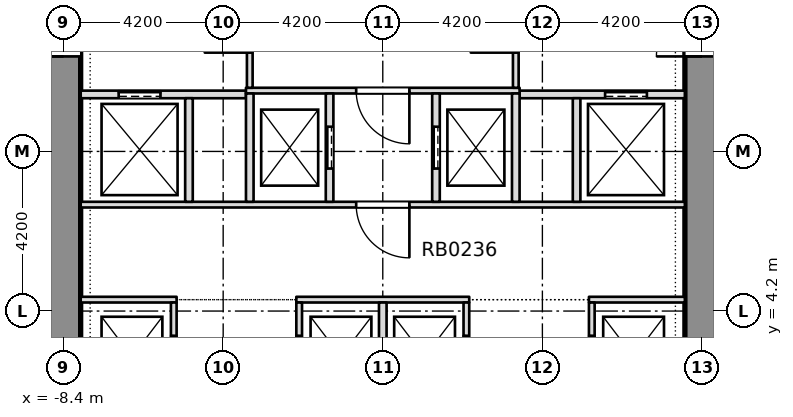
"""IFC4 building model, lengths in metres.
Left out: names, types, materials, properties, quantities, classifications, styles, units other than length and angle.
Written with IfcOpenShell. Run it as: python <this file> out.ifc"""

import sys

from ifc_helpers import new_model, si_unit, direction, frame, frame_2d, origin, place, context, subcontext, project, spatial, rectangle, extrude, element, fill, save


model = new_model("IFC4")
c1 = context("Model", 3, precision=1e-05, world=origin(), true_north=direction((0.0, 1.0)))
c2 = subcontext(c1, "Body", "Model", "MODEL_VIEW")
j1 = project(units=[si_unit("LENGTHUNIT", "METRE"), si_unit("PLANEANGLEUNIT", "RADIAN")], contexts=[c1])
p1 = place(None, origin())
s1 = spatial("IfcSite", under=j1, at=p1, CompositionType="ELEMENT")
p2 = place(p1, origin())
s2 = spatial("IfcBuilding", under=s1, at=p2, CompositionType="ELEMENT")
p3 = place(p2, frame((0.0, 0.0, -8.4)))
s3 = spatial("IfcBuildingStorey", under=s2, at=p3, CompositionType="ELEMENT", Elevation=-8.4)
p4 = place(p3, frame((-8.4, -7.5, 0.0), z_axis=(0.0, 0.0, 1.0), x_axis=(0.0, 1.0, 0.0)))
e1 = element("IfcWall", 1, at=p4, inside=s3, PredefinedType="SHEAR", context=c2, shape_type="SweptSolid", body=[
    extrude(rectangle(XDim=28.35, YDim=0.9, at=frame_2d((14.175, 0.0))), origin(), (0.0, 0.0, 1.0), 3.85),
])
p5 = place(p4, frame((18.4, 0.0, 0.0)))
e2 = element("IfcOpeningElement", 2, at=p5, cuts=e1, PredefinedType="OPENING", context=c2, shape_type="SweptSolid", body=[
    extrude(rectangle(XDim=1.2, YDim=2.1, at=frame_2d((0.6, 1.05))), frame((0.0, 0.46, 0.0), z_axis=(0.0, -1.0, 0.0), x_axis=(1.0, 0.0, 0.0)), (0.0, 0.0, 1.0), 0.92),
])
p6 = place(p3, frame((8.4, -7.5, 0.0), z_axis=(0.0, 0.0, 1.0), x_axis=(0.0, 1.0, 0.0)))
e3 = element("IfcWall", 3, at=p6, inside=s3, PredefinedType="SHEAR", context=c2, shape_type="SweptSolid", body=[
    extrude(rectangle(XDim=28.35, YDim=0.9, at=frame_2d((14.175, 0.0))), origin(), (0.0, 0.0, 1.0), 3.85),
])
p7 = place(p6, frame((18.4, 0.0, 0.0)))
e4 = element("IfcOpeningElement", 4, at=p7, cuts=e3, PredefinedType="OPENING", context=c2, shape_type="SweptSolid", body=[
    extrude(rectangle(XDim=1.2, YDim=2.1, at=frame_2d((0.6, 1.05))), frame((0.0, 0.46, 0.0), z_axis=(0.0, -1.0, 0.0), x_axis=(1.0, 0.0, 0.0)), (0.0, 0.0, 1.0), 0.92),
])
p8 = place(p3, frame((-7.949, 4.5, 0.0), z_axis=(0.0, 0.0, 1.0), x_axis=(1.0, 0.0, 0.0)))
e5 = element("IfcWall", 5, at=p8, inside=s3, PredefinedType="PARTITIONING", context=c2, shape_type="SweptSolid", body=[
    extrude(rectangle(XDim=2.524, YDim=0.15, at=frame_2d((1.262, 0.0))), origin(), (0.0, 0.0, 1.0), 3.85),
])
p9 = place(p3, frame((-2.275, 4.5, 0.0), z_axis=(0.0, 0.0, 1.0), x_axis=(1.0, 0.0, 0.0)))
e6 = element("IfcWall", 6, at=p9, inside=s3, PredefinedType="PARTITIONING", context=c2, shape_type="SweptSolid", body=[
    extrude(rectangle(XDim=4.55, YDim=0.15, at=frame_2d((2.275, 0.0))), origin(), (0.0, 0.0, 1.0), 3.85),
])
p10 = place(p3, frame((5.425, 4.5, 0.0), z_axis=(0.0, 0.0, 1.0), x_axis=(1.0, 0.0, 0.0)))
e7 = element("IfcWall", 7, at=p10, inside=s3, PredefinedType="PARTITIONING", context=c2, shape_type="SweptSolid", body=[
    extrude(rectangle(XDim=2.524, YDim=0.15, at=frame_2d((1.262, 0.0))), origin(), (0.0, 0.0, 1.0), 3.85),
])
p11 = place(p3, frame((-7.949, 7.0, 0.0), z_axis=(0.0, 0.0, 1.0), x_axis=(1.0, 0.0, 0.0)))
e8 = element("IfcWall", 8, at=p11, inside=s3, PredefinedType="PARTITIONING", context=c2, shape_type="SweptSolid", body=[
    extrude(rectangle(XDim=15.898, YDim=0.15, at=frame_2d((7.949, 0.0))), origin(), (0.0, 0.0, 1.0), 3.85),
])
p12 = place(p11, frame((7.249, 0.0, 0.0)))
e9 = element("IfcOpeningElement", 9, at=p12, cuts=e8, PredefinedType="OPENING", context=c2, shape_type="SweptSolid", body=[
    extrude(rectangle(XDim=1.4, YDim=2.1, at=frame_2d((0.7, 1.05))), frame((0.0, 0.085, 0.0), z_axis=(0.0, -1.0, 0.0), x_axis=(1.0, 0.0, 0.0)), (0.0, 0.0, 1.0), 0.17),
])
p13 = place(p3, frame((-7.949, 9.9, 0.0), z_axis=(0.0, 0.0, 1.0), x_axis=(1.0, 0.0, 0.0)))
e10 = element("IfcWall", 10, at=p13, inside=s3, PredefinedType="PARTITIONING", context=c2, shape_type="SweptSolid", body=[
    extrude(rectangle(XDim=4.349, YDim=0.2, at=frame_2d((2.174, 0.0))), origin(), (0.0, 0.0, 1.0), 3.85),
])
p14 = place(p13, frame((0.999, 0.0, 0.0)))
e11 = element("IfcOpeningElement", 11, at=p14, cuts=e10, PredefinedType="OPENING", context=c2, shape_type="SweptSolid", body=[
    extrude(rectangle(XDim=1.1, YDim=2.1, at=frame_2d((0.55, 1.05))), frame((0.0, 0.11, 0.0), z_axis=(0.0, -1.0, 0.0), x_axis=(1.0, 0.0, 0.0)), (0.0, 0.0, 1.0), 0.22),
])
p15 = place(p3, frame((3.6, 9.9, 0.0), z_axis=(0.0, 0.0, 1.0), x_axis=(1.0, 0.0, 0.0)))
e12 = element("IfcWall", 12, at=p15, inside=s3, PredefinedType="PARTITIONING", context=c2, shape_type="SweptSolid", body=[
    extrude(rectangle(XDim=4.349, YDim=0.2, at=frame_2d((2.174, 0.0))), origin(), (0.0, 0.0, 1.0), 3.85),
])
p16 = place(p15, frame((2.25, 0.0, 0.0)))
e13 = element("IfcOpeningElement", 13, at=p16, cuts=e12, PredefinedType="OPENING", context=c2, shape_type="SweptSolid", body=[
    extrude(rectangle(XDim=1.1, YDim=2.1, at=frame_2d((0.55, 1.05))), frame((0.0, 0.11, 0.0), z_axis=(0.0, -1.0, 0.0), x_axis=(1.0, 0.0, 0.0)), (0.0, 0.0, 1.0), 0.22),
])
p17 = place(p3, frame((-3.6, 10.0, 0.0), z_axis=(0.0, 0.0, 1.0), x_axis=(1.0, 0.0, 0.0)))
e14 = element("IfcWall", 14, at=p17, inside=s3, PredefinedType="PARTITIONING", context=c2, shape_type="SweptSolid", body=[
    extrude(rectangle(XDim=7.2, YDim=0.15, at=frame_2d((3.6, 0.0))), origin(), (0.0, 0.0, 1.0), 3.85),
])
p18 = place(p17, frame((2.9, 0.0, 0.0)))
e15 = element("IfcOpeningElement", 15, at=p18, cuts=e14, PredefinedType="OPENING", context=c2, shape_type="SweptSolid", body=[
    extrude(rectangle(XDim=1.4, YDim=2.1, at=frame_2d((0.7, 1.05))), frame((0.0, 0.085, 0.0), z_axis=(0.0, -1.0, 0.0), x_axis=(1.0, 0.0, 0.0)), (0.0, 0.0, 1.0), 0.17),
])
p19 = place(p3, frame((-5.5, -7.499, 0.0), z_axis=(0.0, 0.0, 1.0), x_axis=(0.0, 1.0, 0.0)))
e16 = element("IfcWall", 16, at=p19, inside=s3, PredefinedType="PARTITIONING", context=c2, shape_type="SweptSolid", body=[
    extrude(rectangle(XDim=11.924, YDim=0.15, at=frame_2d((5.962, 0.0))), origin(), (0.0, 0.0, 1.0), 3.85),
])
p20 = place(p19, frame((0.949, 0.0, 0.0)))
e17 = element("IfcOpeningElement", 17, at=p20, cuts=e16, PredefinedType="OPENING", context=c2, shape_type="SweptSolid", body=[
    extrude(rectangle(XDim=1.1, YDim=2.1, at=frame_2d((0.55, 1.05))), frame((0.0, 0.085, 0.0), z_axis=(0.0, -1.0, 0.0), x_axis=(1.0, 0.0, 0.0)), (0.0, 0.0, 1.0), 0.17),
])
p21 = place(p19, frame((3.949, 0.0, 0.0)))
e18 = element("IfcOpeningElement", 18, at=p21, cuts=e16, PredefinedType="OPENING", context=c2, shape_type="SweptSolid", body=[
    extrude(rectangle(XDim=1.1, YDim=2.1, at=frame_2d((0.55, 1.05))), frame((0.0, 0.085, 0.0), z_axis=(0.0, -1.0, 0.0), x_axis=(1.0, 0.0, 0.0)), (0.0, 0.0, 1.0), 0.17),
])
p22 = place(p19, frame((6.949, 0.0, 0.0)))
e19 = element("IfcOpeningElement", 19, at=p22, cuts=e16, PredefinedType="OPENING", context=c2, shape_type="SweptSolid", body=[
    extrude(rectangle(XDim=1.1, YDim=2.1, at=frame_2d((0.55, 1.05))), frame((0.0, 0.085, 0.0), z_axis=(0.0, -1.0, 0.0), x_axis=(1.0, 0.0, 0.0)), (0.0, 0.0, 1.0), 0.17),
])
p23 = place(p19, frame((9.949, 0.0, 0.0)))
e20 = element("IfcOpeningElement", 20, at=p23, cuts=e16, PredefinedType="OPENING", context=c2, shape_type="SweptSolid", body=[
    extrude(rectangle(XDim=1.1, YDim=2.1, at=frame_2d((0.55, 1.05))), frame((0.0, 0.085, 0.0), z_axis=(0.0, -1.0, 0.0), x_axis=(1.0, 0.0, 0.0)), (0.0, 0.0, 1.0), 0.17),
])
p24 = place(p3, frame((-5.1, 7.075, 0.0), z_axis=(0.0, 0.0, 1.0), x_axis=(0.0, 1.0, 0.0)))
e21 = element("IfcWall", 21, at=p24, inside=s3, PredefinedType="PARTITIONING", context=c2, shape_type="SweptSolid", body=[
    extrude(rectangle(XDim=2.725, YDim=0.2, at=frame_2d((1.363, 0.0))), origin(), (0.0, 0.0, 1.0), 3.85),
])
p25 = place(p3, frame((-3.5, 7.075, 0.0), z_axis=(0.0, 0.0, 1.0), x_axis=(0.0, 1.0, 0.0)))
e22 = element("IfcWall", 22, at=p25, inside=s3, PredefinedType="PARTITIONING", context=c2, shape_type="SweptSolid", body=[
    extrude(rectangle(XDim=2.85, YDim=0.2, at=frame_2d((1.425, 0.0))), origin(), (0.0, 0.0, 1.0), 3.85),
])
p26 = place(p3, frame((-3.5, 10.075, 0.0), z_axis=(0.0, 0.0, 1.0), x_axis=(0.0, 1.0, 0.0)))
e23 = element("IfcWall", 23, at=p26, inside=s3, PredefinedType="PARTITIONING", context=c2, shape_type="SweptSolid", body=[
    extrude(rectangle(XDim=3.075, YDim=0.15, at=frame_2d((1.538, 0.0))), origin(), (0.0, 0.0, 1.0), 3.85),
])
p27 = place(p26, frame((0.925, 0.0, 0.0)))
e24 = element("IfcOpeningElement", 24, at=p27, cuts=e23, PredefinedType="OPENING", context=c2, shape_type="SweptSolid", body=[
    extrude(rectangle(XDim=1.2, YDim=2.1, at=frame_2d((0.6, 1.05))), frame((0.0, 0.085, 0.0), z_axis=(0.0, -1.0, 0.0), x_axis=(1.0, 0.0, 0.0)), (0.0, 0.0, 1.0), 0.17),
])
p28 = place(p3, frame((-2.2, -7.499, 0.0), z_axis=(0.0, 0.0, 1.0), x_axis=(0.0, 1.0, 0.0)))
e25 = element("IfcWall", 25, at=p28, inside=s3, PredefinedType="PARTITIONING", context=c2, shape_type="SweptSolid", body=[
    extrude(rectangle(XDim=11.924, YDim=0.15, at=frame_2d((5.962, 0.0))), origin(), (0.0, 0.0, 1.0), 3.85),
])
p29 = place(p28, frame((0.949, 0.0, 0.0)))
e26 = element("IfcOpeningElement", 26, at=p29, cuts=e25, PredefinedType="OPENING", context=c2, shape_type="SweptSolid", body=[
    extrude(rectangle(XDim=1.1, YDim=2.1, at=frame_2d((0.55, 1.05))), frame((0.0, 0.085, 0.0), z_axis=(0.0, -1.0, 0.0), x_axis=(1.0, 0.0, 0.0)), (0.0, 0.0, 1.0), 0.17),
])
p30 = place(p28, frame((3.949, 0.0, 0.0)))
e27 = element("IfcOpeningElement", 27, at=p30, cuts=e25, PredefinedType="OPENING", context=c2, shape_type="SweptSolid", body=[
    extrude(rectangle(XDim=1.1, YDim=2.1, at=frame_2d((0.55, 1.05))), frame((0.0, 0.085, 0.0), z_axis=(0.0, -1.0, 0.0), x_axis=(1.0, 0.0, 0.0)), (0.0, 0.0, 1.0), 0.17),
])
p31 = place(p28, frame((6.949, 0.0, 0.0)))
e28 = element("IfcOpeningElement", 28, at=p31, cuts=e25, PredefinedType="OPENING", context=c2, shape_type="SweptSolid", body=[
    extrude(rectangle(XDim=1.1, YDim=2.1, at=frame_2d((0.55, 1.05))), frame((0.0, 0.085, 0.0), z_axis=(0.0, -1.0, 0.0), x_axis=(1.0, 0.0, 0.0)), (0.0, 0.0, 1.0), 0.17),
])
p32 = place(p28, frame((9.949, 0.0, 0.0)))
e29 = element("IfcOpeningElement", 29, at=p32, cuts=e25, PredefinedType="OPENING", context=c2, shape_type="SweptSolid", body=[
    extrude(rectangle(XDim=1.1, YDim=2.1, at=frame_2d((0.55, 1.05))), frame((0.0, 0.085, 0.0), z_axis=(0.0, -1.0, 0.0), x_axis=(1.0, 0.0, 0.0)), (0.0, 0.0, 1.0), 0.17),
])
p33 = place(p3, frame((-1.4, 7.075, 0.0), z_axis=(0.0, 0.0, 1.0), x_axis=(0.0, 1.0, 0.0)))
e30 = element("IfcWall", 30, at=p33, inside=s3, PredefinedType="PARTITIONING", context=c2, shape_type="SweptSolid", body=[
    extrude(rectangle(XDim=2.85, YDim=0.2, at=frame_2d((1.425, 0.0))), origin(), (0.0, 0.0, 1.0), 3.85),
])
p34 = place(p33, frame((0.875, 0.0, 0.0)))
e31 = element("IfcOpeningElement", 31, at=p34, cuts=e30, PredefinedType="OPENING", context=c2, shape_type="SweptSolid", body=[
    extrude(rectangle(XDim=1.1, YDim=2.1, at=frame_2d((0.55, 1.05))), frame((0.0, 0.11, 0.0), z_axis=(0.0, -1.0, 0.0), x_axis=(1.0, 0.0, 0.0)), (0.0, 0.0, 1.0), 0.22),
])
p35 = place(p3, frame((0.0, -7.499, 0.0), z_axis=(0.0, 0.0, 1.0), x_axis=(0.0, 1.0, 0.0)))
e32 = element("IfcWall", 32, at=p35, inside=s3, PredefinedType="PARTITIONING", context=c2, shape_type="SweptSolid", body=[
    extrude(rectangle(XDim=11.924, YDim=0.2, at=frame_2d((5.962, 0.0))), origin(), (0.0, 0.0, 1.0), 3.85),
])
p36 = place(p3, frame((1.4, 7.075, 0.0), z_axis=(0.0, 0.0, 1.0), x_axis=(0.0, 1.0, 0.0)))
e33 = element("IfcWall", 33, at=p36, inside=s3, PredefinedType="PARTITIONING", context=c2, shape_type="SweptSolid", body=[
    extrude(rectangle(XDim=2.85, YDim=0.2, at=frame_2d((1.425, 0.0))), origin(), (0.0, 0.0, 1.0), 3.85),
])
p37 = place(p36, frame((0.875, 0.0, 0.0)))
e34 = element("IfcOpeningElement", 34, at=p37, cuts=e33, PredefinedType="OPENING", context=c2, shape_type="SweptSolid", body=[
    extrude(rectangle(XDim=1.1, YDim=2.1, at=frame_2d((0.55, 1.05))), frame((0.0, 0.11, 0.0), z_axis=(0.0, -1.0, 0.0), x_axis=(1.0, 0.0, 0.0)), (0.0, 0.0, 1.0), 0.22),
])
p38 = place(p3, frame((2.2, -7.499, 0.0), z_axis=(0.0, 0.0, 1.0), x_axis=(0.0, 1.0, 0.0)))
e35 = element("IfcWall", 35, at=p38, inside=s3, PredefinedType="PARTITIONING", context=c2, shape_type="SweptSolid", body=[
    extrude(rectangle(XDim=11.924, YDim=0.15, at=frame_2d((5.962, 0.0))), origin(), (0.0, 0.0, 1.0), 3.85),
])
p39 = place(p38, frame((0.949, 0.0, 0.0)))
e36 = element("IfcOpeningElement", 36, at=p39, cuts=e35, PredefinedType="OPENING", context=c2, shape_type="SweptSolid", body=[
    extrude(rectangle(XDim=1.1, YDim=2.1, at=frame_2d((0.55, 1.05))), frame((0.0, 0.085, 0.0), z_axis=(0.0, -1.0, 0.0), x_axis=(1.0, 0.0, 0.0)), (0.0, 0.0, 1.0), 0.17),
])
p40 = place(p38, frame((3.949, 0.0, 0.0)))
e37 = element("IfcOpeningElement", 37, at=p40, cuts=e35, PredefinedType="OPENING", context=c2, shape_type="SweptSolid", body=[
    extrude(rectangle(XDim=1.1, YDim=2.1, at=frame_2d((0.55, 1.05))), frame((0.0, 0.085, 0.0), z_axis=(0.0, -1.0, 0.0), x_axis=(1.0, 0.0, 0.0)), (0.0, 0.0, 1.0), 0.17),
])
p41 = place(p38, frame((6.949, 0.0, 0.0)))
e38 = element("IfcOpeningElement", 38, at=p41, cuts=e35, PredefinedType="OPENING", context=c2, shape_type="SweptSolid", body=[
    extrude(rectangle(XDim=1.1, YDim=2.1, at=frame_2d((0.55, 1.05))), frame((0.0, 0.085, 0.0), z_axis=(0.0, -1.0, 0.0), x_axis=(1.0, 0.0, 0.0)), (0.0, 0.0, 1.0), 0.17),
])
p42 = place(p38, frame((9.949, 0.0, 0.0)))
e39 = element("IfcOpeningElement", 39, at=p42, cuts=e35, PredefinedType="OPENING", context=c2, shape_type="SweptSolid", body=[
    extrude(rectangle(XDim=1.1, YDim=2.1, at=frame_2d((0.55, 1.05))), frame((0.0, 0.085, 0.0), z_axis=(0.0, -1.0, 0.0), x_axis=(1.0, 0.0, 0.0)), (0.0, 0.0, 1.0), 0.17),
])
p43 = place(p3, frame((3.5, 7.075, 0.0), z_axis=(0.0, 0.0, 1.0), x_axis=(0.0, 1.0, 0.0)))
e40 = element("IfcWall", 40, at=p43, inside=s3, PredefinedType="PARTITIONING", context=c2, shape_type="SweptSolid", body=[
    extrude(rectangle(XDim=2.85, YDim=0.2, at=frame_2d((1.425, 0.0))), origin(), (0.0, 0.0, 1.0), 3.85),
])
p44 = place(p3, frame((3.5, 10.075, 0.0), z_axis=(0.0, 0.0, 1.0), x_axis=(0.0, 1.0, 0.0)))
e41 = element("IfcWall", 41, at=p44, inside=s3, PredefinedType="PARTITIONING", context=c2, shape_type="SweptSolid", body=[
    extrude(rectangle(XDim=3.075, YDim=0.15, at=frame_2d((1.538, 0.0))), origin(), (0.0, 0.0, 1.0), 3.85),
])
p45 = place(p44, frame((0.925, 0.0, 0.0)))
e42 = element("IfcOpeningElement", 42, at=p45, cuts=e41, PredefinedType="OPENING", context=c2, shape_type="SweptSolid", body=[
    extrude(rectangle(XDim=1.2, YDim=2.1, at=frame_2d((0.6, 1.05))), frame((0.0, 0.085, 0.0), z_axis=(0.0, -1.0, 0.0), x_axis=(1.0, 0.0, 0.0)), (0.0, 0.0, 1.0), 0.17),
])
p46 = place(p3, frame((5.1, 7.075, 0.0), z_axis=(0.0, 0.0, 1.0), x_axis=(0.0, 1.0, 0.0)))
e43 = element("IfcWall", 43, at=p46, inside=s3, PredefinedType="PARTITIONING", context=c2, shape_type="SweptSolid", body=[
    extrude(rectangle(XDim=2.725, YDim=0.2, at=frame_2d((1.363, 0.0))), origin(), (0.0, 0.0, 1.0), 3.85),
])
p47 = place(p3, frame((5.5, -7.499, 0.0), z_axis=(0.0, 0.0, 1.0), x_axis=(0.0, 1.0, 0.0)))
e44 = element("IfcWall", 44, at=p47, inside=s3, PredefinedType="PARTITIONING", context=c2, shape_type="SweptSolid", body=[
    extrude(rectangle(XDim=11.924, YDim=0.15, at=frame_2d((5.962, 0.0))), origin(), (0.0, 0.0, 1.0), 3.85),
])
p48 = place(p47, frame((0.949, 0.0, 0.0)))
e45 = element("IfcOpeningElement", 45, at=p48, cuts=e44, PredefinedType="OPENING", context=c2, shape_type="SweptSolid", body=[
    extrude(rectangle(XDim=1.1, YDim=2.1, at=frame_2d((0.55, 1.05))), frame((0.0, 0.085, 0.0), z_axis=(0.0, -1.0, 0.0), x_axis=(1.0, 0.0, 0.0)), (0.0, 0.0, 1.0), 0.17),
])
p49 = place(p47, frame((3.949, 0.0, 0.0)))
e46 = element("IfcOpeningElement", 46, at=p49, cuts=e44, PredefinedType="OPENING", context=c2, shape_type="SweptSolid", body=[
    extrude(rectangle(XDim=1.1, YDim=2.1, at=frame_2d((0.55, 1.05))), frame((0.0, 0.085, 0.0), z_axis=(0.0, -1.0, 0.0), x_axis=(1.0, 0.0, 0.0)), (0.0, 0.0, 1.0), 0.17),
])
p50 = place(p47, frame((6.949, 0.0, 0.0)))
e47 = element("IfcOpeningElement", 47, at=p50, cuts=e44, PredefinedType="OPENING", context=c2, shape_type="SweptSolid", body=[
    extrude(rectangle(XDim=1.1, YDim=2.1, at=frame_2d((0.55, 1.05))), frame((0.0, 0.085, 0.0), z_axis=(0.0, -1.0, 0.0), x_axis=(1.0, 0.0, 0.0)), (0.0, 0.0, 1.0), 0.17),
])
p51 = place(p47, frame((9.949, 0.0, 0.0)))
e48 = element("IfcOpeningElement", 48, at=p51, cuts=e44, PredefinedType="OPENING", context=c2, shape_type="SweptSolid", body=[
    extrude(rectangle(XDim=1.1, YDim=2.1, at=frame_2d((0.55, 1.05))), frame((0.0, 0.085, 0.0), z_axis=(0.0, -1.0, 0.0), x_axis=(1.0, 0.0, 0.0)), (0.0, 0.0, 1.0), 0.17),
])
p52 = place(p23, origin())
e49 = element("IfcDoor", 49, at=p52, inside=s3, OperationType="SLIDING_TO_RIGHT", PredefinedType="DOOR", context=c2, shape_type="SweptSolid", body=[
    extrude(rectangle(XDim=1.1, YDim=2.1, at=frame_2d((0.55, 1.05))), frame((0.0, 0.025, 0.0), z_axis=(0.0, -1.0, 0.0), x_axis=(1.0, 0.0, 0.0)), (0.0, 0.0, 1.0), 0.05),
])
fill(e20, e49)
p53 = place(p32, origin())
e50 = element("IfcDoor", 50, at=p53, inside=s3, OperationType="SLIDING_TO_RIGHT", PredefinedType="DOOR", context=c2, shape_type="SweptSolid", body=[
    extrude(rectangle(XDim=1.1, YDim=2.1, at=frame_2d((0.55, 1.05))), frame((0.0, 0.025, 0.0), z_axis=(0.0, -1.0, 0.0), x_axis=(1.0, 0.0, 0.0)), (0.0, 0.0, 1.0), 0.05),
])
fill(e29, e50)
p54 = place(p42, origin())
e51 = element("IfcDoor", 51, at=p54, inside=s3, OperationType="SLIDING_TO_RIGHT", PredefinedType="DOOR", context=c2, shape_type="SweptSolid", body=[
    extrude(rectangle(XDim=1.1, YDim=2.1, at=frame_2d((0.55, 1.05))), frame((0.0, 0.025, 0.0), z_axis=(0.0, -1.0, 0.0), x_axis=(1.0, 0.0, 0.0)), (0.0, 0.0, 1.0), 0.05),
])
fill(e39, e51)
p55 = place(p51, origin())
e52 = element("IfcDoor", 52, at=p55, inside=s3, OperationType="SLIDING_TO_RIGHT", PredefinedType="DOOR", context=c2, shape_type="SweptSolid", body=[
    extrude(rectangle(XDim=1.1, YDim=2.1, at=frame_2d((0.55, 1.05))), frame((0.0, 0.025, 0.0), z_axis=(0.0, -1.0, 0.0), x_axis=(1.0, 0.0, 0.0)), (0.0, 0.0, 1.0), 0.05),
])
fill(e48, e52)
p56 = place(p14, origin())
e53 = element("IfcDoor", 53, at=p56, inside=s3, OperationType="SLIDING_TO_RIGHT", PredefinedType="DOOR", context=c2, shape_type="SweptSolid", body=[
    extrude(rectangle(XDim=1.1, YDim=2.1, at=frame_2d((0.55, 1.05))), frame((0.0, 0.025, 0.0), z_axis=(0.0, -1.0, 0.0), x_axis=(1.0, 0.0, 0.0)), (0.0, 0.0, 1.0), 0.05),
])
fill(e11, e53)
p57 = place(p16, origin())
e54 = element("IfcDoor", 54, at=p57, inside=s3, OperationType="SLIDING_TO_LEFT", PredefinedType="DOOR", context=c2, shape_type="SweptSolid", body=[
    extrude(rectangle(XDim=1.1, YDim=2.1, at=frame_2d((0.55, 1.05))), frame((0.0, 0.025, 0.0), z_axis=(0.0, -1.0, 0.0), x_axis=(1.0, 0.0, 0.0)), (0.0, 0.0, 1.0), 0.05),
])
fill(e13, e54)
p58 = place(p12, origin())
e55 = element("IfcDoor", 55, at=p58, inside=s3, OperationType="SINGLE_SWING_RIGHT", PredefinedType="DOOR", context=c2, shape_type="SweptSolid", body=[
    extrude(rectangle(XDim=1.4, YDim=2.1, at=frame_2d((0.7, 1.05))), frame((0.0, 0.025, 0.0), z_axis=(0.0, -1.0, 0.0), x_axis=(1.0, 0.0, 0.0)), (0.0, 0.0, 1.0), 0.05),
])
fill(e9, e55)
p59 = place(p18, origin())
e56 = element("IfcDoor", 56, at=p59, inside=s3, OperationType="SINGLE_SWING_RIGHT", PredefinedType="DOOR", context=c2, shape_type="SweptSolid", body=[
    extrude(rectangle(XDim=1.4, YDim=2.1, at=frame_2d((0.7, 1.05))), frame((0.0, 0.025, 0.0), z_axis=(0.0, -1.0, 0.0), x_axis=(1.0, 0.0, 0.0)), (0.0, 0.0, 1.0), 0.05),
])
fill(e15, e56)
p60 = place(p34, origin())
e57 = element("IfcDoor", 57, at=p60, inside=s3, OperationType="SLIDING_TO_RIGHT", PredefinedType="DOOR", context=c2, shape_type="SweptSolid", body=[
    extrude(rectangle(XDim=1.1, YDim=2.1, at=frame_2d((0.55, 1.05))), frame((0.0, 0.025, 0.0), z_axis=(0.0, -1.0, 0.0), x_axis=(1.0, 0.0, 0.0)), (0.0, 0.0, 1.0), 0.05),
])
fill(e31, e57)
p61 = place(p37, origin())
e58 = element("IfcDoor", 58, at=p61, inside=s3, OperationType="SLIDING_TO_RIGHT", PredefinedType="DOOR", context=c2, shape_type="SweptSolid", body=[
    extrude(rectangle(XDim=1.1, YDim=2.1, at=frame_2d((0.55, 1.05))), frame((0.0, 0.025, 0.0), z_axis=(0.0, -1.0, 0.0), x_axis=(1.0, 0.0, 0.0)), (0.0, 0.0, 1.0), 0.05),
])
fill(e34, e58)
p62 = place(p5, origin())
e59 = element("IfcDoor", 59, at=p62, inside=s3, OperationType="SINGLE_SWING_LEFT", PredefinedType="DOOR", context=c2, shape_type="SweptSolid", body=[
    extrude(rectangle(XDim=1.2, YDim=2.1, at=frame_2d((0.6, 1.05))), frame((0.0, 0.025, 0.0), z_axis=(0.0, -1.0, 0.0), x_axis=(1.0, 0.0, 0.0)), (0.0, 0.0, 1.0), 0.05),
])
fill(e2, e59)
p63 = place(p7, origin())
e60 = element("IfcDoor", 60, at=p63, inside=s3, OperationType="SINGLE_SWING_LEFT", PredefinedType="DOOR", context=c2, shape_type="SweptSolid", body=[
    extrude(rectangle(XDim=1.2, YDim=2.1, at=frame_2d((0.6, 1.05))), frame((0.0, 0.025, 0.0), z_axis=(0.0, -1.0, 0.0), x_axis=(1.0, 0.0, 0.0)), (0.0, 0.0, 1.0), 0.05),
])
fill(e4, e60)
save(model, sys.argv[1])
